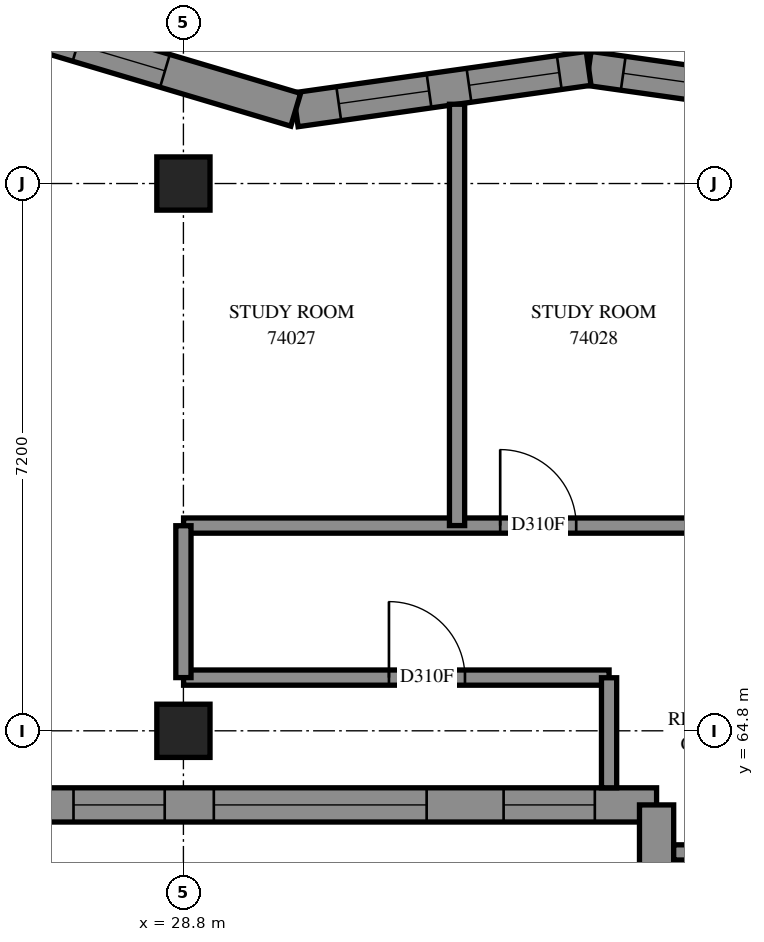
"""IFC4 building model, lengths in metres.
Left out: names, types, materials, properties, quantities, classifications, styles, units other than length and angle.
Written with IfcOpenShell. Run it as: python <this file> out.ifc"""

import sys

from ifc_helpers import new_model, si_unit, direction, frame, frame_2d, origin, origin_2d, place, context, subcontext, project, spatial, polyline, rectangle, outline, extrude, element, fill, save


model = new_model("IFC4")
c1 = context("Model", 3, precision=1e-05, world=origin(), true_north=direction((0.0, 1.0)))
c2 = subcontext(c1, "Body", "Model", "MODEL_VIEW")
j1 = project(units=[si_unit("LENGTHUNIT", "METRE"), si_unit("PLANEANGLEUNIT", "RADIAN")], contexts=[c1])
p1 = place(None, origin())
s1 = spatial("IfcSite", under=j1, at=p1, CompositionType="ELEMENT")
p2 = place(p1, origin())
s2 = spatial("IfcBuilding", under=s1, at=p2, CompositionType="ELEMENT")
p3 = place(p2, frame((0.0, 0.0, 271.0)))
s3 = spatial("IfcBuildingStorey", under=s2, at=p3, CompositionType="ELEMENT", Elevation=271.0)
for number, where, z_axis, x_axis in (
    (1, (28.8, 64.8, 0.0), (0.0, 0.0, 1.0), (1.0, 0.0, 0.0)),
    (2, (28.8, 72.0, 0.0), (0.0, 0.0, 1.0), (1.0, 0.0, 0.0)),
):
    element("IfcColumn", number, at=place(p3, frame(where, z_axis=z_axis, x_axis=x_axis)), inside=s3, PredefinedType="COLUMN", context=c2, shape_type="SweptSolid", body=[
        extrude(rectangle(XDim=0.7, YDim=0.7, at=origin_2d()), origin(), (0.0, 0.0, 1.0), 3.1),
    ])
p4 = place(p3, frame((37.968, 72.973, 0.0), z_axis=(0.0, 0.0, 1.0), x_axis=(-0.9901676803, 0.1398855422, 0.0)))
e3 = element("IfcWall", 3, at=p4, inside=s3, PredefinedType="SOLIDWALL", context=c2, shape_type="SweptSolid", body=[
    extrude(outline(polyline([(0.032, -0.225), (3.906, -0.225), (3.843, 0.225), (-0.032, 0.225), (0.032, -0.225)])), origin(), (0.0, 0.0, 1.0), 3.1),
])
p5 = place(p4, frame((0.494, 0.0, 0.45)))
e4 = element("IfcOpeningElement", 4, at=p5, cuts=e3, PredefinedType="OPENING", context=c2, shape_type="SweptSolid", body=[
    extrude(rectangle(XDim=1.2, YDim=2.55, at=frame_2d((0.6, 1.275))), frame((0.0, 0.235, 0.0), z_axis=(0.0, -1.0, 0.0), x_axis=(1.0, 0.0, 0.0)), (0.0, 0.0, 1.0), 0.47),
])
p6 = place(p4, frame((2.215, 0.0, 0.45)))
e5 = element("IfcOpeningElement", 5, at=p6, cuts=e3, PredefinedType="OPENING", context=c2, shape_type="SweptSolid", body=[
    extrude(rectangle(XDim=1.2, YDim=2.55, at=frame_2d((0.6, 1.275))), frame((0.0, 0.235, 0.0), z_axis=(0.0, -1.0, 0.0), x_axis=(1.0, 0.0, 0.0)), (0.0, 0.0, 1.0), 0.47),
])
p7 = place(p3, frame((34.131, 73.515, 0.0), z_axis=(0.0, 0.0, 1.0), x_axis=(-0.9901656891, -0.1398996361, 0.0)))
e6 = element("IfcWall", 6, at=p7, inside=s3, PredefinedType="SOLIDWALL", context=c2, shape_type="SweptSolid", body=[
    extrude(outline(polyline([(-0.032, -0.225), (3.843, -0.225), (3.941, 0.225), (0.032, 0.225), (-0.032, -0.225)])), origin(), (0.0, 0.0, 1.0), 3.1),
])
p8 = place(p7, frame((0.39, 0.0, 0.45)))
e7 = element("IfcOpeningElement", 7, at=p8, cuts=e6, PredefinedType="OPENING", context=c2, shape_type="SweptSolid", body=[
    extrude(rectangle(XDim=1.2, YDim=2.55, at=frame_2d((0.6, 1.275))), frame((0.0, 0.235, 0.0), z_axis=(0.0, -1.0, 0.0), x_axis=(1.0, 0.0, 0.0)), (0.0, 0.0, 1.0), 0.47),
])
p9 = place(p7, frame((2.12, 0.0, 0.45)))
e8 = element("IfcOpeningElement", 8, at=p9, cuts=e6, PredefinedType="OPENING", context=c2, shape_type="SweptSolid", body=[
    extrude(rectangle(XDim=1.2, YDim=2.55, at=frame_2d((0.6, 1.275))), frame((0.0, 0.235, 0.0), z_axis=(0.0, -1.0, 0.0), x_axis=(1.0, 0.0, 0.0)), (0.0, 0.0, 1.0), 0.47),
])
p10 = place(p3, frame((30.277, 72.97, 0.0), z_axis=(0.0, 0.0, 1.0), x_axis=(-0.9584347191, 0.2853119156, 0.0)))
e9 = element("IfcWall", 9, at=p10, inside=s3, PredefinedType="SOLIDWALL", context=c2, shape_type="SweptSolid", body=[
    extrude(outline(polyline([(0.049, -0.225), (4.052, -0.225), (3.449, 0.225), (-0.049, 0.225), (0.049, -0.225)])), origin(), (0.0, 0.0, 1.0), 3.1),
])
p11 = place(p10, frame((1.795, 0.0, 0.45)))
e10 = element("IfcOpeningElement", 10, at=p11, cuts=e9, PredefinedType="OPENING", context=c2, shape_type="SweptSolid", body=[
    extrude(rectangle(XDim=1.2, YDim=2.55, at=frame_2d((0.6, 1.275))), frame((0.0, 0.235, 0.0), z_axis=(0.0, -1.0, 0.0), x_axis=(1.0, 0.0, 0.0)), (0.0, 0.0, 1.0), 0.47),
])
p12 = place(p3, frame((26.683, 63.825, 0.0), z_axis=(0.0, 0.0, 1.0), x_axis=(1.0, 0.0, 0.0)))
e11 = element("IfcWall", 11, at=p12, inside=s3, PredefinedType="SOLIDWALL", context=c2, shape_type="SweptSolid", body=[
    extrude(outline(polyline([(-0.225, -0.225), (8.117, -0.225), (8.567, 0.225), (0.225, 0.225), (-0.225, -0.225)])), origin(), (0.0, 0.0, 1.0), 3.1),
])
p13 = place(p12, frame((2.517, 0.0, 0.45)))
e12 = element("IfcOpeningElement", 12, at=p13, cuts=e11, PredefinedType="OPENING", context=c2, shape_type="SweptSolid", body=[
    extrude(rectangle(XDim=2.8, YDim=2.55, at=frame_2d((1.4, 1.275))), frame((0.0, 0.235, 0.0), z_axis=(0.0, -1.0, 0.0), x_axis=(1.0, 0.0, 0.0)), (0.0, 0.0, 1.0), 0.47),
])
p14 = place(p12, frame((0.671, 0.0, 0.45)))
e13 = element("IfcOpeningElement", 13, at=p14, cuts=e11, PredefinedType="OPENING", context=c2, shape_type="SweptSolid", body=[
    extrude(rectangle(XDim=1.2, YDim=2.55, at=frame_2d((0.6, 1.275))), frame((0.0, 0.235, 0.0), z_axis=(0.0, -1.0, 0.0), x_axis=(1.0, 0.0, 0.0)), (0.0, 0.0, 1.0), 0.47),
])
p15 = place(p12, frame((6.33, 0.0, 0.45)))
e14 = element("IfcOpeningElement", 14, at=p15, cuts=e11, PredefinedType="OPENING", context=c2, shape_type="SweptSolid", body=[
    extrude(rectangle(XDim=1.2, YDim=2.55, at=frame_2d((0.6, 1.275))), frame((0.0, 0.235, 0.0), z_axis=(0.0, -1.0, 0.0), x_axis=(1.0, 0.0, 0.0)), (0.0, 0.0, 1.0), 0.47),
])
p16 = place(p3, frame((35.025, 63.825, 0.0), z_axis=(0.0, 0.0, 1.0), x_axis=(0.0, -1.0, 0.0)))
e15 = element("IfcWall", 15, at=p16, inside=s3, PredefinedType="SOLIDWALL", context=c2, shape_type="SweptSolid", body=[
    extrude(outline(polyline([(0.225, -0.225), (7.425, -0.225), (6.975, 0.225), (-0.225, 0.225), (0.225, -0.225)])), origin(), (0.0, 0.0, 1.0), 3.1),
])
p17 = place(p16, frame((3.175, 0.0, 0.45)))
e16 = element("IfcOpeningElement", 16, at=p17, cuts=e15, PredefinedType="OPENING", context=c2, shape_type="SweptSolid", body=[
    extrude(rectangle(XDim=2.8, YDim=2.55, at=frame_2d((1.4, 1.275))), frame((0.0, 0.235, 0.0), z_axis=(0.0, -1.0, 0.0), x_axis=(1.0, 0.0, 0.0)), (0.0, 0.0, 1.0), 0.47),
])
p18 = place(p16, frame((1.163, 0.0, 0.45)))
e17 = element("IfcOpeningElement", 17, at=p18, cuts=e15, PredefinedType="OPENING", context=c2, shape_type="SweptSolid", body=[
    extrude(rectangle(XDim=1.2, YDim=2.55, at=frame_2d((0.6, 1.275))), frame((0.0, 0.235, 0.0), z_axis=(0.0, -1.0, 0.0), x_axis=(1.0, 0.0, 0.0)), (0.0, 0.0, 1.0), 0.47),
])
p19 = place(p3, frame((28.802, 67.5, 0.0), z_axis=(0.0, 0.0, 1.0), x_axis=(1.0, 0.0, 0.0)))
e18 = element("IfcWall", 18, at=p19, inside=s3, PredefinedType="PARTITIONING", context=c2, shape_type="SweptSolid", body=[
    extrude(rectangle(XDim=11.798, YDim=0.2, at=frame_2d((5.899, 0.0))), origin(), (0.0, 0.0, 1.0), 3.1),
])
p20 = place(p19, frame((4.165, 0.0, 0.0)))
e19 = element("IfcOpeningElement", 19, at=p20, cuts=e18, PredefinedType="OPENING", context=c2, shape_type="SweptSolid", body=[
    extrude(rectangle(XDim=1.0, YDim=2.1, at=frame_2d((0.5, 1.05))), frame((0.0, 0.11, 0.0), z_axis=(0.0, -1.0, 0.0), x_axis=(1.0, 0.0, 0.0)), (0.0, 0.0, 1.0), 0.22),
])
p21 = place(p19, frame((9.29, 0.0, 0.0)))
e20 = element("IfcOpeningElement", 20, at=p21, cuts=e18, PredefinedType="OPENING", context=c2, shape_type="SweptSolid", body=[
    extrude(rectangle(XDim=1.0, YDim=2.1, at=frame_2d((0.5, 1.05))), frame((0.0, 0.11, 0.0), z_axis=(0.0, -1.0, 0.0), x_axis=(1.0, 0.0, 0.0)), (0.0, 0.0, 1.0), 0.22),
])
p22 = place(p3, frame((28.802, 65.5, 0.0), z_axis=(0.0, 0.0, 1.0), x_axis=(1.0, 0.0, 0.0)))
e21 = element("IfcWall", 21, at=p22, inside=s3, PredefinedType="PARTITIONING", context=c2, shape_type="SweptSolid", body=[
    extrude(rectangle(XDim=5.598, YDim=0.2, at=frame_2d((2.799, 0.0))), origin(), (0.0, 0.0, 1.0), 3.1),
])
p23 = place(p22, frame((2.702, 0.0, 0.0)))
e22 = element("IfcOpeningElement", 22, at=p23, cuts=e21, PredefinedType="OPENING", context=c2, shape_type="SweptSolid", body=[
    extrude(rectangle(XDim=1.0, YDim=2.1, at=frame_2d((0.5, 1.05))), frame((0.0, 0.11, 0.0), z_axis=(0.0, -1.0, 0.0), x_axis=(1.0, 0.0, 0.0)), (0.0, 0.0, 1.0), 0.22),
])
p24 = place(p3, frame((32.4, 67.5, 0.0), z_axis=(0.0, 0.0, 1.0), x_axis=(0.0, 1.0, 0.0)))
e23 = element("IfcWall", 23, at=p24, inside=s3, PredefinedType="PARTITIONING", context=c2, shape_type="SweptSolid", body=[
    extrude(rectangle(XDim=5.543, YDim=0.2, at=frame_2d((2.772, 0.0))), origin(), (0.0, 0.0, 1.0), 3.1),
])
p25 = place(p3, frame((35.25, 63.2, 0.0), z_axis=(0.0, 0.0, 1.0), x_axis=(1.0, 0.0, 0.0)))
e24 = element("IfcWall", 24, at=p25, inside=s3, PredefinedType="PARTITIONING", context=c2, shape_type="SweptSolid", body=[
    extrude(rectangle(XDim=2.348, YDim=0.2, at=frame_2d((1.174, 0.0))), origin(), (0.0, 0.0, 1.0), 3.1),
])
p26 = place(p3, frame((28.8, 65.5, 0.0), z_axis=(0.0, 0.0, 1.0), x_axis=(0.0, 1.0, 0.0)))
e25 = element("IfcWall", 25, at=p26, inside=s3, PredefinedType="PARTITIONING", context=c2, shape_type="SweptSolid", body=[
    extrude(rectangle(XDim=1.998, YDim=0.2, at=frame_2d((0.999, 0.0))), origin(), (0.0, 0.0, 1.0), 2.6),
])
p27 = place(p3, frame((34.4, 64.05, 0.0), z_axis=(0.0, 0.0, 1.0), x_axis=(0.0, 1.0, 0.0)))
e26 = element("IfcWall", 26, at=p27, inside=s3, PredefinedType="PARTITIONING", context=c2, shape_type="SweptSolid", body=[
    extrude(rectangle(XDim=1.448, YDim=0.2, at=frame_2d((0.724, 0.0))), origin(), (0.0, 0.0, 1.0), 3.1),
])
p28 = place(p6, origin())
e27 = element("IfcWindow", 27, at=p28, inside=s3, PartitioningType="SINGLE_PANEL", PredefinedType="WINDOW", context=c2, shape_type="SweptSolid", body=[
    extrude(rectangle(XDim=1.2, YDim=2.55, at=frame_2d((0.6, 1.275))), frame((0.0, 0.205, 0.0), z_axis=(0.0, -1.0, 0.0), x_axis=(1.0, 0.0, 0.0)), (0.0, 0.0, 1.0), 0.06),
])
fill(e5, e27)
p29 = place(p8, origin())
e28 = element("IfcWindow", 28, at=p29, inside=s3, PartitioningType="SINGLE_PANEL", PredefinedType="WINDOW", context=c2, shape_type="SweptSolid", body=[
    extrude(rectangle(XDim=1.2, YDim=2.55, at=frame_2d((0.6, 1.275))), frame((0.0, 0.205, 0.0), z_axis=(0.0, -1.0, 0.0), x_axis=(1.0, 0.0, 0.0)), (0.0, 0.0, 1.0), 0.06),
])
fill(e7, e28)
p30 = place(p9, origin())
e29 = element("IfcWindow", 29, at=p30, inside=s3, PartitioningType="SINGLE_PANEL", PredefinedType="WINDOW", context=c2, shape_type="SweptSolid", body=[
    extrude(rectangle(XDim=1.2, YDim=2.55, at=frame_2d((0.6, 1.275))), frame((0.0, 0.205, 0.0), z_axis=(0.0, -1.0, 0.0), x_axis=(1.0, 0.0, 0.0)), (0.0, 0.0, 1.0), 0.06),
])
fill(e8, e29)
p31 = place(p11, origin())
e30 = element("IfcWindow", 30, at=p31, inside=s3, PartitioningType="SINGLE_PANEL", PredefinedType="WINDOW", context=c2, shape_type="SweptSolid", body=[
    extrude(rectangle(XDim=1.2, YDim=2.55, at=frame_2d((0.6, 1.275))), frame((0.0, 0.205, 0.0), z_axis=(0.0, -1.0, 0.0), x_axis=(1.0, 0.0, 0.0)), (0.0, 0.0, 1.0), 0.06),
])
fill(e10, e30)
p32 = place(p13, origin())
e31 = element("IfcWindow", 31, at=p32, inside=s3, PartitioningType="SINGLE_PANEL", PredefinedType="WINDOW", context=c2, shape_type="SweptSolid", body=[
    extrude(rectangle(XDim=2.8, YDim=2.55, at=frame_2d((1.4, 1.275))), frame((0.0, 0.205, 0.0), z_axis=(0.0, -1.0, 0.0), x_axis=(1.0, 0.0, 0.0)), (0.0, 0.0, 1.0), 0.06),
])
fill(e12, e31)
p33 = place(p14, origin())
e32 = element("IfcWindow", 32, at=p33, inside=s3, PartitioningType="SINGLE_PANEL", PredefinedType="WINDOW", context=c2, shape_type="SweptSolid", body=[
    extrude(rectangle(XDim=1.2, YDim=2.55, at=frame_2d((0.6, 1.275))), frame((0.0, 0.205, 0.0), z_axis=(0.0, -1.0, 0.0), x_axis=(1.0, 0.0, 0.0)), (0.0, 0.0, 1.0), 0.06),
])
fill(e13, e32)
p34 = place(p15, origin())
e33 = element("IfcWindow", 33, at=p34, inside=s3, PartitioningType="SINGLE_PANEL", PredefinedType="WINDOW", context=c2, shape_type="SweptSolid", body=[
    extrude(rectangle(XDim=1.2, YDim=2.55, at=frame_2d((0.6, 1.275))), frame((0.0, 0.205, 0.0), z_axis=(0.0, -1.0, 0.0), x_axis=(1.0, 0.0, 0.0)), (0.0, 0.0, 1.0), 0.06),
])
fill(e14, e33)
p35 = place(p23, origin())
e34 = element("IfcDoor", 34, at=p35, inside=s3, OperationType="SINGLE_SWING_RIGHT", PredefinedType="DOOR", context=c2, shape_type="SweptSolid", body=[
    extrude(rectangle(XDim=1.0, YDim=2.1, at=frame_2d((0.5, 1.05))), frame((0.0, 0.025, 0.0), z_axis=(0.0, -1.0, 0.0), x_axis=(1.0, 0.0, 0.0)), (0.0, 0.0, 1.0), 0.05),
])
fill(e22, e34)
p36 = place(p20, origin())
e35 = element("IfcDoor", 35, at=p36, inside=s3, OperationType="SINGLE_SWING_LEFT", PredefinedType="DOOR", context=c2, shape_type="SweptSolid", body=[
    extrude(rectangle(XDim=1.0, YDim=2.1, at=frame_2d((0.5, 1.05))), frame((0.0, 0.025, 0.0), z_axis=(0.0, -1.0, 0.0), x_axis=(1.0, 0.0, 0.0)), (0.0, 0.0, 1.0), 0.05),
])
fill(e19, e35)
save(model, sys.argv[1])
